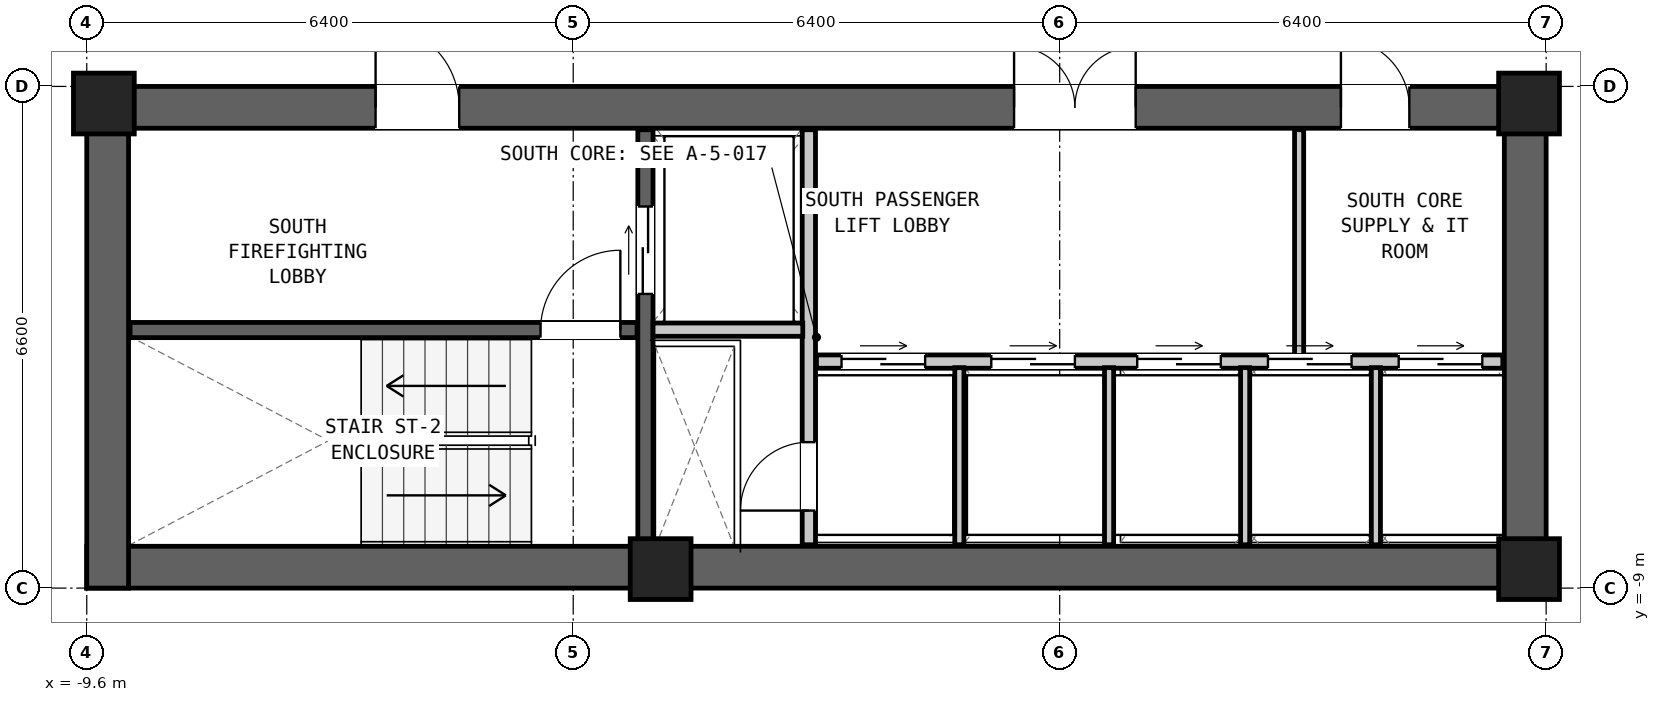
"""IFC4 building model, lengths in metres.
Left out: names, types, materials, properties, quantities, classifications, styles, units other than length and angle.
Written with IfcOpenShell. Run it as: python <this file> out.ifc"""

import sys

from ifc_helpers import new_model, si_unit, direction, frame, frame_2d, origin, origin_2d, place, context, subcontext, project, spatial, rectangle, extrude, element, fill, save


model = new_model("IFC4")
c1 = context("Model", 3, precision=1e-05, world=origin(), true_north=direction((0.0, 1.0)))
c2 = subcontext(c1, "Body", "Model", "MODEL_VIEW")
j1 = project(units=[si_unit("LENGTHUNIT", "METRE"), si_unit("PLANEANGLEUNIT", "RADIAN")], contexts=[c1])
p1 = place(None, origin())
s1 = spatial("IfcSite", under=j1, at=p1, CompositionType="ELEMENT")
p2 = place(p1, origin())
s2 = spatial("IfcBuilding", under=s1, at=p2, CompositionType="ELEMENT")
p3 = place(p2, frame((0.0, 0.0, 50.5)))
s3 = spatial("IfcBuildingStorey", under=s2, at=p3, CompositionType="ELEMENT", Elevation=50.5)
p4 = place(p3, frame((-9.6, -8.725, 0.0), z_axis=(0.0, 0.0, 1.0), x_axis=(1.0, 0.0, 0.0)))
e1 = element("IfcWall", 1, at=p4, inside=s3, PredefinedType="SHEAR", context=c2, shape_type="SweptSolid", body=[
    extrude(rectangle(XDim=19.2, YDim=0.55, at=frame_2d((9.6, 0.0))), origin(), (0.0, 0.0, 1.0), 3.05),
])
p5 = place(p3, frame((-9.6, -2.675, 0.0), z_axis=(0.0, 0.0, 1.0), x_axis=(1.0, 0.0, 0.0)))
e2 = element("IfcWall", 2, at=p5, inside=s3, PredefinedType="SHEAR", context=c2, shape_type="SweptSolid", body=[
    extrude(rectangle(XDim=19.2, YDim=0.55, at=frame_2d((9.6, 0.0))), origin(), (0.0, 0.0, 1.0), 3.05),
])
p6 = place(p5, frame((3.8, 0.0, 0.0)))
e3 = element("IfcOpeningElement", 3, at=p6, cuts=e2, PredefinedType="OPENING", context=c2, shape_type="SweptSolid", body=[
    extrude(rectangle(XDim=1.1, YDim=2.08, at=frame_2d((0.55, 1.04))), frame((0.0, 0.287, 0.0), z_axis=(0.0, -1.0, 0.0), x_axis=(1.0, 0.0, 0.0)), (0.0, 0.0, 1.0), 0.574),
])
p7 = place(p5, frame((12.2, 0.0, 0.0)))
e4 = element("IfcOpeningElement", 4, at=p7, cuts=e2, PredefinedType="OPENING", context=c2, shape_type="SweptSolid", body=[
    extrude(rectangle(XDim=1.6, YDim=2.12, at=frame_2d((0.8, 1.06))), frame((0.0, 0.287, 0.0), z_axis=(0.0, -1.0, 0.0), x_axis=(1.0, 0.0, 0.0)), (0.0, 0.0, 1.0), 0.574),
])
p8 = place(p5, frame((16.5, 0.0, 0.0)))
e5 = element("IfcOpeningElement", 5, at=p8, cuts=e2, PredefinedType="OPENING", context=c2, shape_type="SweptSolid", body=[
    extrude(rectangle(XDim=0.9, YDim=2.05, at=frame_2d((0.45, 1.025))), frame((0.0, 0.287, 0.0), z_axis=(0.0, -1.0, 0.0), x_axis=(1.0, 0.0, 0.0)), (0.0, 0.0, 1.0), 0.574),
])
for number, where, z_axis, x_axis in (
    (6, (-9.325, -9.0, 0.0), (0.0, 0.0, 1.0), (0.0, 1.0, 0.0)),
    (7, (9.325, -9.0, 0.0), (0.0, 0.0, 1.0), (0.0, 1.0, 0.0)),
):
    element("IfcWall", number, at=place(p3, frame(where, z_axis=z_axis, x_axis=x_axis)), inside=s3, PredefinedType="SHEAR", context=c2, shape_type="SweptSolid", body=[
        extrude(rectangle(XDim=6.6, YDim=0.55, at=frame_2d((3.3, 0.0))), origin(), (0.0, 0.0, 1.0), 3.05),
    ])
for number, where, z_axis, x_axis in (
    (8, (-9.375, -2.625, 0.0), (0.0, 0.0, 1.0), (1.0, 0.0, 0.0)),
    (9, (9.375, -2.625, 0.0), (0.0, 0.0, 1.0), (1.0, 0.0, 0.0)),
    (10, (-2.05, -8.75, 0.0), (0.0, 0.0, 1.0), (1.0, 0.0, 0.0)),
    (11, (9.375, -8.75, 0.0), (0.0, 0.0, 1.0), (1.0, 0.0, 0.0)),
):
    element("IfcColumn", number, at=place(p3, frame(where, z_axis=z_axis, x_axis=x_axis)), inside=s3, PredefinedType="COLUMN", context=c2, shape_type="SweptSolid", body=[
        extrude(rectangle(XDim=0.8, YDim=0.8, at=origin_2d()), origin(), (0.0, 0.0, 1.0), 3.05),
    ])
p9 = place(p3, frame((-9.03, -5.605, 0.0), z_axis=(0.0, 0.0, 1.0), x_axis=(1.0, 0.0, 0.0)))
e12 = element("IfcWall", 12, at=p9, inside=s3, PredefinedType="SHEAR", context=c2, shape_type="SweptSolid", body=[
    extrude(rectangle(XDim=6.67, YDim=0.2, at=frame_2d((3.335, 0.0))), origin(), (0.0, 0.0, 1.0), 2.83),
])
p10 = place(p9, frame((5.4, 0.0, 0.0)))
e13 = element("IfcOpeningElement", 13, at=p10, cuts=e12, PredefinedType="OPENING", context=c2, shape_type="SweptSolid", body=[
    extrude(rectangle(XDim=1.05, YDim=2.08, at=frame_2d((0.525, 1.04))), frame((0.0, 0.112, 0.0), z_axis=(0.0, -1.0, 0.0), x_axis=(1.0, 0.0, 0.0)), (0.0, 0.0, 1.0), 0.224),
])
p11 = place(p3, frame((-2.25, -8.43, 0.0), z_axis=(0.0, 0.0, 1.0), x_axis=(0.0, 1.0, 0.0)))
e14 = element("IfcWall", 14, at=p11, inside=s3, PredefinedType="SHEAR", context=c2, shape_type="SweptSolid", body=[
    extrude(rectangle(XDim=5.46, YDim=0.2, at=frame_2d((2.73, 0.0))), origin(), (0.0, 0.0, 1.0), 2.83),
])
p12 = place(p11, frame((3.3, 0.0, 0.0)))
e15 = element("IfcOpeningElement", 15, at=p12, cuts=e14, PredefinedType="OPENING", context=c2, shape_type="SweptSolid", body=[
    extrude(rectangle(XDim=1.15, YDim=2.08, at=frame_2d((0.575, 1.04))), frame((0.0, 0.112, 0.0), z_axis=(0.0, -1.0, 0.0), x_axis=(1.0, 0.0, 0.0)), (0.0, 0.0, 1.0), 0.224),
])
p13 = place(p3, frame((-0.1, -8.43, 0.0), z_axis=(0.0, 0.0, 1.0), x_axis=(0.0, 1.0, 0.0)))
e16 = element("IfcWall", 16, at=p13, inside=s3, PredefinedType="PARTITIONING", context=c2, shape_type="SweptSolid", body=[
    extrude(rectangle(XDim=5.46, YDim=0.175, at=frame_2d((2.73, 0.0))), origin(), (0.0, 0.0, 1.0), 2.83),
])
p14 = place(p13, frame((0.45, 0.0, 0.0)))
e17 = element("IfcOpeningElement", 17, at=p14, cuts=e16, PredefinedType="OPENING", context=c2, shape_type="SweptSolid", body=[
    extrude(rectangle(XDim=0.9, YDim=2.05, at=frame_2d((0.45, 1.025))), frame((0.0, 0.1, 0.0), z_axis=(0.0, -1.0, 0.0), x_axis=(1.0, 0.0, 0.0)), (0.0, 0.0, 1.0), 0.199),
])
p15 = place(p3, frame((-2.15, -5.6, 0.0), z_axis=(0.0, 0.0, 1.0), x_axis=(1.0, 0.0, 0.0)))
e18 = element("IfcWall", 18, at=p15, inside=s3, PredefinedType="PARTITIONING", context=c2, shape_type="SweptSolid", body=[
    extrude(rectangle(XDim=1.97, YDim=0.175, at=frame_2d((0.985, 0.0))), origin(), (0.0, 0.0, 1.0), 2.83),
])
p16 = place(p3, frame((0.0, -6.02, 0.0), z_axis=(0.0, 0.0, 1.0), x_axis=(1.0, 0.0, 0.0)))
e19 = element("IfcWall", 19, at=p16, inside=s3, PredefinedType="PARTITIONING", context=c2, shape_type="SweptSolid", body=[
    extrude(rectangle(XDim=9.03, YDim=0.175, at=frame_2d((4.515, 0.0))), origin(), (0.0, 0.0, 1.0), 2.83),
])
p17 = place(p16, frame((0.33, 0.0, 0.0)))
e20 = element("IfcOpeningElement", 20, at=p17, cuts=e19, PredefinedType="OPENING", context=c2, shape_type="SweptSolid", body=[
    extrude(rectangle(XDim=1.1, YDim=2.06, at=frame_2d((0.55, 1.03))), frame((0.0, 0.1, 0.0), z_axis=(0.0, -1.0, 0.0), x_axis=(1.0, 0.0, 0.0)), (0.0, 0.0, 1.0), 0.199),
])
p18 = place(p16, frame((2.3, 0.0, 0.0)))
e21 = element("IfcOpeningElement", 21, at=p18, cuts=e19, PredefinedType="OPENING", context=c2, shape_type="SweptSolid", body=[
    extrude(rectangle(XDim=1.1, YDim=2.06, at=frame_2d((0.55, 1.03))), frame((0.0, 0.1, 0.0), z_axis=(0.0, -1.0, 0.0), x_axis=(1.0, 0.0, 0.0)), (0.0, 0.0, 1.0), 0.199),
])
p19 = place(p16, frame((4.22, 0.0, 0.0)))
e22 = element("IfcOpeningElement", 22, at=p19, cuts=e19, PredefinedType="OPENING", context=c2, shape_type="SweptSolid", body=[
    extrude(rectangle(XDim=1.1, YDim=2.06, at=frame_2d((0.55, 1.03))), frame((0.0, 0.1, 0.0), z_axis=(0.0, -1.0, 0.0), x_axis=(1.0, 0.0, 0.0)), (0.0, 0.0, 1.0), 0.199),
])
p20 = place(p16, frame((5.94, 0.0, 0.0)))
e23 = element("IfcOpeningElement", 23, at=p20, cuts=e19, PredefinedType="OPENING", context=c2, shape_type="SweptSolid", body=[
    extrude(rectangle(XDim=1.1, YDim=2.06, at=frame_2d((0.55, 1.03))), frame((0.0, 0.1, 0.0), z_axis=(0.0, -1.0, 0.0), x_axis=(1.0, 0.0, 0.0)), (0.0, 0.0, 1.0), 0.199),
])
p21 = place(p16, frame((7.66, 0.0, 0.0)))
e24 = element("IfcOpeningElement", 24, at=p21, cuts=e19, PredefinedType="OPENING", context=c2, shape_type="SweptSolid", body=[
    extrude(rectangle(XDim=1.1, YDim=2.06, at=frame_2d((0.55, 1.03))), frame((0.0, 0.1, 0.0), z_axis=(0.0, -1.0, 0.0), x_axis=(1.0, 0.0, 0.0)), (0.0, 0.0, 1.0), 0.199),
])
for number, where, z_axis, x_axis in (
    (25, (1.88, -8.43, 0.0), (0.0, 0.0, 1.0), (0.0, 1.0, 0.0)),
    (26, (3.85, -8.43, 0.0), (0.0, 0.0, 1.0), (0.0, 1.0, 0.0)),
    (27, (5.64, -8.43, 0.0), (0.0, 0.0, 1.0), (0.0, 1.0, 0.0)),
    (28, (7.36, -8.43, 0.0), (0.0, 0.0, 1.0), (0.0, 1.0, 0.0)),
):
    element("IfcWall", number, at=place(p3, frame(where, z_axis=z_axis, x_axis=x_axis)), inside=s3, PredefinedType="PARTITIONING", context=c2, shape_type="SweptSolid", body=[
        extrude(rectangle(XDim=2.33, YDim=0.12, at=frame_2d((1.165, 0.0))), origin(), (0.0, 0.0, 1.0), 2.83),
    ])
p22 = place(p3, frame((6.35, -5.94, 0.0), z_axis=(0.0, 0.0, 1.0), x_axis=(0.0, 1.0, 0.0)))
e29 = element("IfcWall", 29, at=p22, inside=s3, PredefinedType="PARTITIONING", context=c2, shape_type="SweptSolid", body=[
    extrude(rectangle(XDim=2.97, YDim=0.12, at=frame_2d((1.485, 0.0))), origin(), (0.0, 0.0, 1.0), 2.83),
])
p23 = place(p10, origin())
e30 = element("IfcDoor", 30, at=p23, inside=s3, OperationType="SINGLE_SWING_RIGHT", PredefinedType="DOOR", context=c2, shape_type="SweptSolid", body=[
    extrude(rectangle(XDim=1.05, YDim=2.08, at=frame_2d((0.525, 1.04))), frame((0.0, 0.025, 0.0), z_axis=(0.0, -1.0, 0.0), x_axis=(1.0, 0.0, 0.0)), (0.0, 0.0, 1.0), 0.05),
])
fill(e13, e30)
p24 = place(p6, origin())
e31 = element("IfcDoor", 31, at=p24, inside=s3, OperationType="SINGLE_SWING_LEFT", PredefinedType="DOOR", context=c2, shape_type="SweptSolid", body=[
    extrude(rectangle(XDim=1.1, YDim=2.08, at=frame_2d((0.55, 1.04))), frame((0.0, 0.025, 0.0), z_axis=(0.0, -1.0, 0.0), x_axis=(1.0, 0.0, 0.0)), (0.0, 0.0, 1.0), 0.05),
])
fill(e3, e31)
p25 = place(p12, origin())
e32 = element("IfcDoor", 32, at=p25, inside=s3, OperationType="DOUBLE_DOOR_SLIDING", PredefinedType="DOOR", context=c2, shape_type="SweptSolid", body=[
    extrude(rectangle(XDim=1.15, YDim=2.08, at=frame_2d((0.575, 1.04))), frame((0.0, 0.025, 0.0), z_axis=(0.0, -1.0, 0.0), x_axis=(1.0, 0.0, 0.0)), (0.0, 0.0, 1.0), 0.05),
])
fill(e15, e32)
p26 = place(p14, origin())
e33 = element("IfcDoor", 33, at=p26, inside=s3, OperationType="SINGLE_SWING_LEFT", PredefinedType="DOOR", context=c2, shape_type="SweptSolid", body=[
    extrude(rectangle(XDim=0.9, YDim=2.05, at=frame_2d((0.45, 1.025))), frame((0.0, 0.025, 0.0), z_axis=(0.0, -1.0, 0.0), x_axis=(1.0, 0.0, 0.0)), (0.0, 0.0, 1.0), 0.05),
])
fill(e17, e33)
p27 = place(p7, origin())
e34 = element("IfcDoor", 34, at=p27, inside=s3, OperationType="DOUBLE_DOOR_SINGLE_SWING", PredefinedType="DOOR", context=c2, shape_type="SweptSolid", body=[
    extrude(rectangle(XDim=1.6, YDim=2.12, at=frame_2d((0.8, 1.06))), frame((0.0, 0.025, 0.0), z_axis=(0.0, -1.0, 0.0), x_axis=(1.0, 0.0, 0.0)), (0.0, 0.0, 1.0), 0.05),
])
fill(e4, e34)
p28 = place(p8, origin())
e35 = element("IfcDoor", 35, at=p28, inside=s3, OperationType="SINGLE_SWING_LEFT", PredefinedType="DOOR", context=c2, shape_type="SweptSolid", body=[
    extrude(rectangle(XDim=0.9, YDim=2.05, at=frame_2d((0.45, 1.025))), frame((0.0, 0.025, 0.0), z_axis=(0.0, -1.0, 0.0), x_axis=(1.0, 0.0, 0.0)), (0.0, 0.0, 1.0), 0.05),
])
fill(e5, e35)
p29 = place(p17, origin())
e36 = element("IfcDoor", 36, at=p29, inside=s3, OperationType="DOUBLE_DOOR_SLIDING", PredefinedType="DOOR", context=c2, shape_type="SweptSolid", body=[
    extrude(rectangle(XDim=1.1, YDim=2.06, at=frame_2d((0.55, 1.03))), frame((0.0, 0.025, 0.0), z_axis=(0.0, -1.0, 0.0), x_axis=(1.0, 0.0, 0.0)), (0.0, 0.0, 1.0), 0.05),
])
fill(e20, e36)
p30 = place(p18, origin())
e37 = element("IfcDoor", 37, at=p30, inside=s3, OperationType="DOUBLE_DOOR_SLIDING", PredefinedType="DOOR", context=c2, shape_type="SweptSolid", body=[
    extrude(rectangle(XDim=1.1, YDim=2.06, at=frame_2d((0.55, 1.03))), frame((0.0, 0.025, 0.0), z_axis=(0.0, -1.0, 0.0), x_axis=(1.0, 0.0, 0.0)), (0.0, 0.0, 1.0), 0.05),
])
fill(e21, e37)
p31 = place(p19, origin())
e38 = element("IfcDoor", 38, at=p31, inside=s3, OperationType="DOUBLE_DOOR_SLIDING", PredefinedType="DOOR", context=c2, shape_type="SweptSolid", body=[
    extrude(rectangle(XDim=1.1, YDim=2.06, at=frame_2d((0.55, 1.03))), frame((0.0, 0.025, 0.0), z_axis=(0.0, -1.0, 0.0), x_axis=(1.0, 0.0, 0.0)), (0.0, 0.0, 1.0), 0.05),
])
fill(e22, e38)
p32 = place(p20, origin())
e39 = element("IfcDoor", 39, at=p32, inside=s3, OperationType="DOUBLE_DOOR_SLIDING", PredefinedType="DOOR", context=c2, shape_type="SweptSolid", body=[
    extrude(rectangle(XDim=1.1, YDim=2.06, at=frame_2d((0.55, 1.03))), frame((0.0, 0.025, 0.0), z_axis=(0.0, -1.0, 0.0), x_axis=(1.0, 0.0, 0.0)), (0.0, 0.0, 1.0), 0.05),
])
fill(e23, e39)
p33 = place(p21, origin())
e40 = element("IfcDoor", 40, at=p33, inside=s3, OperationType="DOUBLE_DOOR_SLIDING", PredefinedType="DOOR", context=c2, shape_type="SweptSolid", body=[
    extrude(rectangle(XDim=1.1, YDim=2.06, at=frame_2d((0.55, 1.03))), frame((0.0, 0.025, 0.0), z_axis=(0.0, -1.0, 0.0), x_axis=(1.0, 0.0, 0.0)), (0.0, 0.0, 1.0), 0.05),
])
fill(e24, e40)
save(model, sys.argv[1])
